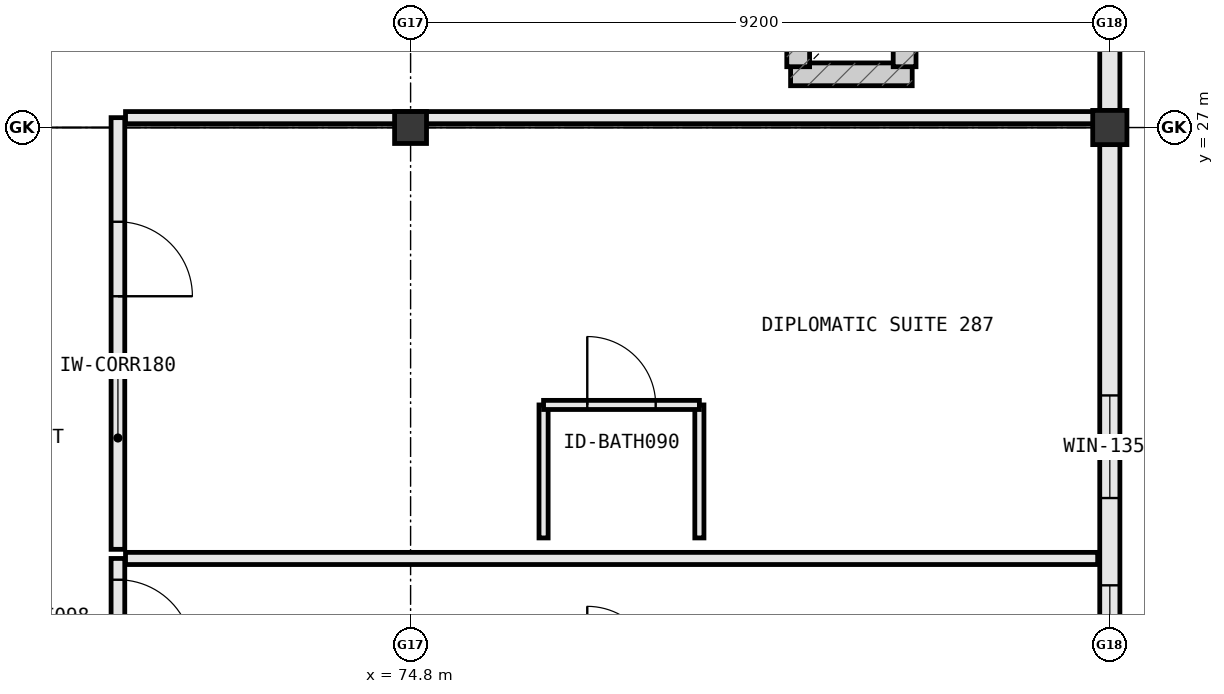
"""IFC4 building model, lengths in metres.
Left out: names, types, materials, properties, quantities, classifications, styles, units other than length and angle.
Written with IfcOpenShell. Run it as: python <this file> out.ifc"""

import sys

from ifc_helpers import new_model, si_unit, direction, frame, frame_2d, origin, origin_2d, place, context, subcontext, project, spatial, rectangle, extrude, element, fill, save


model = new_model("IFC4")
c1 = context("Model", 3, precision=1e-05, world=origin(), true_north=direction((0.0, 1.0)))
c2 = subcontext(c1, "Body", "Model", "MODEL_VIEW")
j1 = project(units=[si_unit("LENGTHUNIT", "METRE"), si_unit("PLANEANGLEUNIT", "RADIAN")], contexts=[c1])
p1 = place(None, origin())
s1 = spatial("IfcSite", under=j1, at=p1, CompositionType="ELEMENT")
p2 = place(p1, origin())
s2 = spatial("IfcBuilding", under=s1, at=p2, CompositionType="ELEMENT")
p3 = place(p2, frame((0.0, 0.0, 42.8)))
s3 = spatial("IfcBuildingStorey", under=s2, at=p3, CompositionType="ELEMENT", Elevation=42.8)
p4 = place(p3, frame((74.8, 27.0, 0.0), z_axis=(0.0, 0.0, 1.0), x_axis=(1.0, 0.0, 0.0)))
e1 = element("IfcColumn", 1, at=p4, inside=s3, PredefinedType="COLUMN", context=c2, shape_type="SweptSolid", body=[
    extrude(rectangle(XDim=0.42, YDim=0.42, at=origin_2d()), origin(), (0.0, 0.0, 1.0), 3.8),
])
p5 = place(p3, frame((84.0, 27.0, 0.0), z_axis=(0.0, 0.0, 1.0), x_axis=(1.0, 0.0, 0.0)))
e2 = element("IfcColumn", 2, at=p5, inside=s3, PredefinedType="COLUMN", context=c2, shape_type="SweptSolid", body=[
    extrude(rectangle(XDim=0.45, YDim=0.45, at=origin_2d()), origin(), (0.0, 0.0, 1.0), 3.8),
])
p6 = place(p3, frame((79.8, 27.7, 0.0), z_axis=(0.0, 0.0, 1.0), x_axis=(1.0, 0.0, 0.0)))
e3 = element("IfcWall", 3, at=p6, inside=s3, PredefinedType="SHEAR", context=c2, shape_type="SweptSolid", body=[
    extrude(rectangle(XDim=1.6, YDim=0.3, at=frame_2d((0.8, 0.0))), origin(), (0.0, 0.0, 1.0), 3.54),
])
for number, where, z_axis, x_axis in (
    (4, (79.9, 29.0, 0.0), (0.0, 0.0, 1.0), (0.0, -1.0, 0.0)),
    (5, (81.3, 27.8, 0.0), (0.0, 0.0, 1.0), (0.0, 1.0, 0.0)),
):
    element("IfcWall", number, at=place(p3, frame(where, z_axis=z_axis, x_axis=x_axis)), inside=s3, PredefinedType="SHEAR", context=c2, shape_type="SweptSolid", body=[
        extrude(rectangle(XDim=1.2, YDim=0.3, at=frame_2d((0.6, 0.0))), origin(), (0.0, 0.0, 1.0), 3.54),
    ])
p7 = place(p3, frame((84.0, 18.823, 0.0), z_axis=(0.0, 0.0, 1.0), x_axis=(0.0, 1.0, 0.0)))
e6 = element("IfcWall", 6, at=p7, inside=s3, PredefinedType="STANDARD", context=c2, shape_type="SweptSolid", body=[
    extrude(rectangle(XDim=7.954, YDim=0.265, at=frame_2d((3.977, 0.0))), origin(), (0.0, 0.0, 1.0), 2.955),
])
p8 = place(p7, frame((3.302, 0.0, 0.85)))
e7 = element("IfcOpeningElement", 7, at=p8, cuts=e6, PredefinedType="OPENING", context=c2, shape_type="SweptSolid", body=[
    extrude(rectangle(XDim=1.35, YDim=1.65, at=frame_2d((0.675, 0.825))), frame((0.0, 0.145, 0.0), z_axis=(0.0, -1.0, 0.0), x_axis=(1.0, 0.0, 0.0)), (0.0, 0.0, 1.0), 0.289),
])
p9 = place(p7, frame((0.354, 0.0, 0.85)))
e8 = element("IfcOpeningElement", 8, at=p9, cuts=e6, PredefinedType="OPENING", context=c2, shape_type="SweptSolid", body=[
    extrude(rectangle(XDim=1.8, YDim=1.85, at=frame_2d((0.9, 0.925))), frame((0.0, 0.145, 0.0), z_axis=(0.0, -1.0, 0.0), x_axis=(1.0, 0.0, 0.0)), (0.0, 0.0, 1.0), 0.289),
])
p10 = place(p3, frame((84.0, 27.223, 0.0), z_axis=(0.0, 0.0, 1.0), x_axis=(0.0, 1.0, 0.0)))
e9 = element("IfcWall", 9, at=p10, inside=s3, PredefinedType="STANDARD", context=c2, shape_type="SweptSolid", body=[
    extrude(rectangle(XDim=8.954, YDim=0.265, at=frame_2d((4.477, 0.0))), origin(), (0.0, 0.0, 1.0), 2.955),
])
p11 = place(p10, frame((3.802, 0.0, 0.85)))
e10 = element("IfcOpeningElement", 10, at=p11, cuts=e9, PredefinedType="OPENING", context=c2, shape_type="SweptSolid", body=[
    extrude(rectangle(XDim=1.35, YDim=1.65, at=frame_2d((0.675, 0.825))), frame((0.0, 0.145, 0.0), z_axis=(0.0, -1.0, 0.0), x_axis=(1.0, 0.0, 0.0)), (0.0, 0.0, 1.0), 0.289),
])
p12 = place(p3, frame((70.95, 21.33, 0.0), z_axis=(0.0, 0.0, 1.0), x_axis=(0.0, -1.0, 0.0)))
e11 = element("IfcWall", 11, at=p12, inside=s3, PredefinedType="PARTITIONING", context=c2, shape_type="SweptSolid", body=[
    extrude(rectangle(XDim=3.43, YDim=0.18, at=frame_2d((1.715, 0.0))), origin(), (0.0, 0.0, 1.0), 3.54),
])
p13 = place(p12, frame((0.28, 0.0, 0.0)))
e12 = element("IfcOpeningElement", 12, at=p13, cuts=e11, PredefinedType="OPENING", context=c2, shape_type="SweptSolid", body=[
    extrude(rectangle(XDim=0.98, YDim=2.18, at=frame_2d((0.49, 1.09))), frame((0.0, 0.102, 0.0), z_axis=(0.0, -1.0, 0.0), x_axis=(1.0, 0.0, 0.0)), (0.0, 0.0, 1.0), 0.204),
])
p14 = place(p3, frame((71.05, 21.33, 0.0), z_axis=(0.0, 0.0, 1.0), x_axis=(1.0, 0.0, 0.0)))
e13 = element("IfcWall", 13, at=p14, inside=s3, PredefinedType="PARTITIONING", context=c2, shape_type="SweptSolid", body=[
    extrude(rectangle(XDim=12.79, YDim=0.16, at=frame_2d((6.395, 0.0))), origin(), (0.0, 0.0, 1.0), 3.54),
])
p15 = place(p3, frame((70.95, 27.13, 0.0), z_axis=(0.0, 0.0, 1.0), x_axis=(0.0, -1.0, 0.0)))
e14 = element("IfcWall", 14, at=p15, inside=s3, PredefinedType="PARTITIONING", context=c2, shape_type="SweptSolid", body=[
    extrude(rectangle(XDim=5.68, YDim=0.18, at=frame_2d((2.84, 0.0))), origin(), (0.0, 0.0, 1.0), 3.54),
])
p16 = place(p15, frame((1.37, 0.0, 0.0)))
e15 = element("IfcOpeningElement", 15, at=p16, cuts=e14, PredefinedType="OPENING", context=c2, shape_type="SweptSolid", body=[
    extrude(rectangle(XDim=0.98, YDim=2.18, at=frame_2d((0.49, 1.09))), frame((0.0, 0.102, 0.0), z_axis=(0.0, -1.0, 0.0), x_axis=(1.0, 0.0, 0.0)), (0.0, 0.0, 1.0), 0.204),
])
p17 = place(p3, frame((71.05, 27.13, 0.0), z_axis=(0.0, 0.0, 1.0), x_axis=(1.0, 0.0, 0.0)))
e16 = element("IfcWall", 16, at=p17, inside=s3, PredefinedType="PARTITIONING", context=c2, shape_type="SweptSolid", body=[
    extrude(rectangle(XDim=12.79, YDim=0.16, at=frame_2d((6.395, 0.0))), origin(), (0.0, 0.0, 1.0), 2.915),
])
for number, where, z_axis, x_axis in (
    (17, (76.55, 21.6, 0.0), (0.0, 0.0, 1.0), (0.0, 1.0, 0.0)),
    (18, (78.6, 21.6, 0.0), (0.0, 0.0, 1.0), (0.0, 1.0, 0.0)),
):
    element("IfcWall", number, at=place(p3, frame(where, z_axis=z_axis, x_axis=x_axis)), inside=s3, PredefinedType="PARTITIONING", context=c2, shape_type="SweptSolid", body=[
        extrude(rectangle(XDim=1.75, YDim=0.12, at=frame_2d((0.875, 0.0))), origin(), (0.0, 0.0, 1.0), 3.54),
    ])
p18 = place(p3, frame((76.55, 23.35, 0.0), z_axis=(0.0, 0.0, 1.0), x_axis=(1.0, 0.0, 0.0)))
e19 = element("IfcWall", 19, at=p18, inside=s3, PredefinedType="PARTITIONING", context=c2, shape_type="SweptSolid", body=[
    extrude(rectangle(XDim=2.05, YDim=0.12, at=frame_2d((1.025, 0.0))), origin(), (0.0, 0.0, 1.0), 3.54),
])
p19 = place(p18, frame((0.575, 0.0, 0.0)))
e20 = element("IfcOpeningElement", 20, at=p19, cuts=e19, PredefinedType="OPENING", context=c2, shape_type="SweptSolid", body=[
    extrude(rectangle(XDim=0.9, YDim=2.15, at=frame_2d((0.45, 1.075))), frame((0.0, 0.072, 0.0), z_axis=(0.0, -1.0, 0.0), x_axis=(1.0, 0.0, 0.0)), (0.0, 0.0, 1.0), 0.144),
])
p20 = place(p8, origin())
e21 = element("IfcWindow", 21, at=p20, inside=s3, PartitioningType="SINGLE_PANEL", PredefinedType="WINDOW", context=c2, shape_type="SweptSolid", body=[
    extrude(rectangle(XDim=1.35, YDim=1.65, at=frame_2d((0.675, 0.825))), frame((0.0, 0.03, 0.0), z_axis=(0.0, -1.0, 0.0), x_axis=(1.0, 0.0, 0.0)), (0.0, 0.0, 1.0), 0.06),
])
fill(e7, e21)
p21 = place(p9, origin())
e22 = element("IfcWindow", 22, at=p21, inside=s3, PartitioningType="SINGLE_PANEL", PredefinedType="WINDOW", context=c2, shape_type="SweptSolid", body=[
    extrude(rectangle(XDim=1.8, YDim=1.85, at=frame_2d((0.9, 0.925))), frame((0.0, 0.03, 0.0), z_axis=(0.0, -1.0, 0.0), x_axis=(1.0, 0.0, 0.0)), (0.0, 0.0, 1.0), 0.06),
])
fill(e8, e22)
p22 = place(p13, origin())
e23 = element("IfcDoor", 23, at=p22, inside=s3, OperationType="SINGLE_SWING_RIGHT", PredefinedType="DOOR", context=c2, shape_type="SweptSolid", body=[
    extrude(rectangle(XDim=0.98, YDim=2.18, at=frame_2d((0.49, 1.09))), frame((0.0, 0.025, 0.0), z_axis=(0.0, -1.0, 0.0), x_axis=(1.0, 0.0, 0.0)), (0.0, 0.0, 1.0), 0.05),
])
fill(e12, e23)
p23 = place(p16, origin())
e24 = element("IfcDoor", 24, at=p23, inside=s3, OperationType="SINGLE_SWING_RIGHT", PredefinedType="DOOR", context=c2, shape_type="SweptSolid", body=[
    extrude(rectangle(XDim=0.98, YDim=2.18, at=frame_2d((0.49, 1.09))), frame((0.0, 0.025, 0.0), z_axis=(0.0, -1.0, 0.0), x_axis=(1.0, 0.0, 0.0)), (0.0, 0.0, 1.0), 0.05),
])
fill(e15, e24)
p24 = place(p19, origin())
e25 = element("IfcDoor", 25, at=p24, inside=s3, OperationType="SINGLE_SWING_LEFT", PredefinedType="DOOR", context=c2, shape_type="SweptSolid", body=[
    extrude(rectangle(XDim=0.9, YDim=2.15, at=frame_2d((0.45, 1.075))), frame((0.0, 0.025, 0.0), z_axis=(0.0, -1.0, 0.0), x_axis=(1.0, 0.0, 0.0)), (0.0, 0.0, 1.0), 0.05),
])
fill(e20, e25)
save(model, sys.argv[1])
